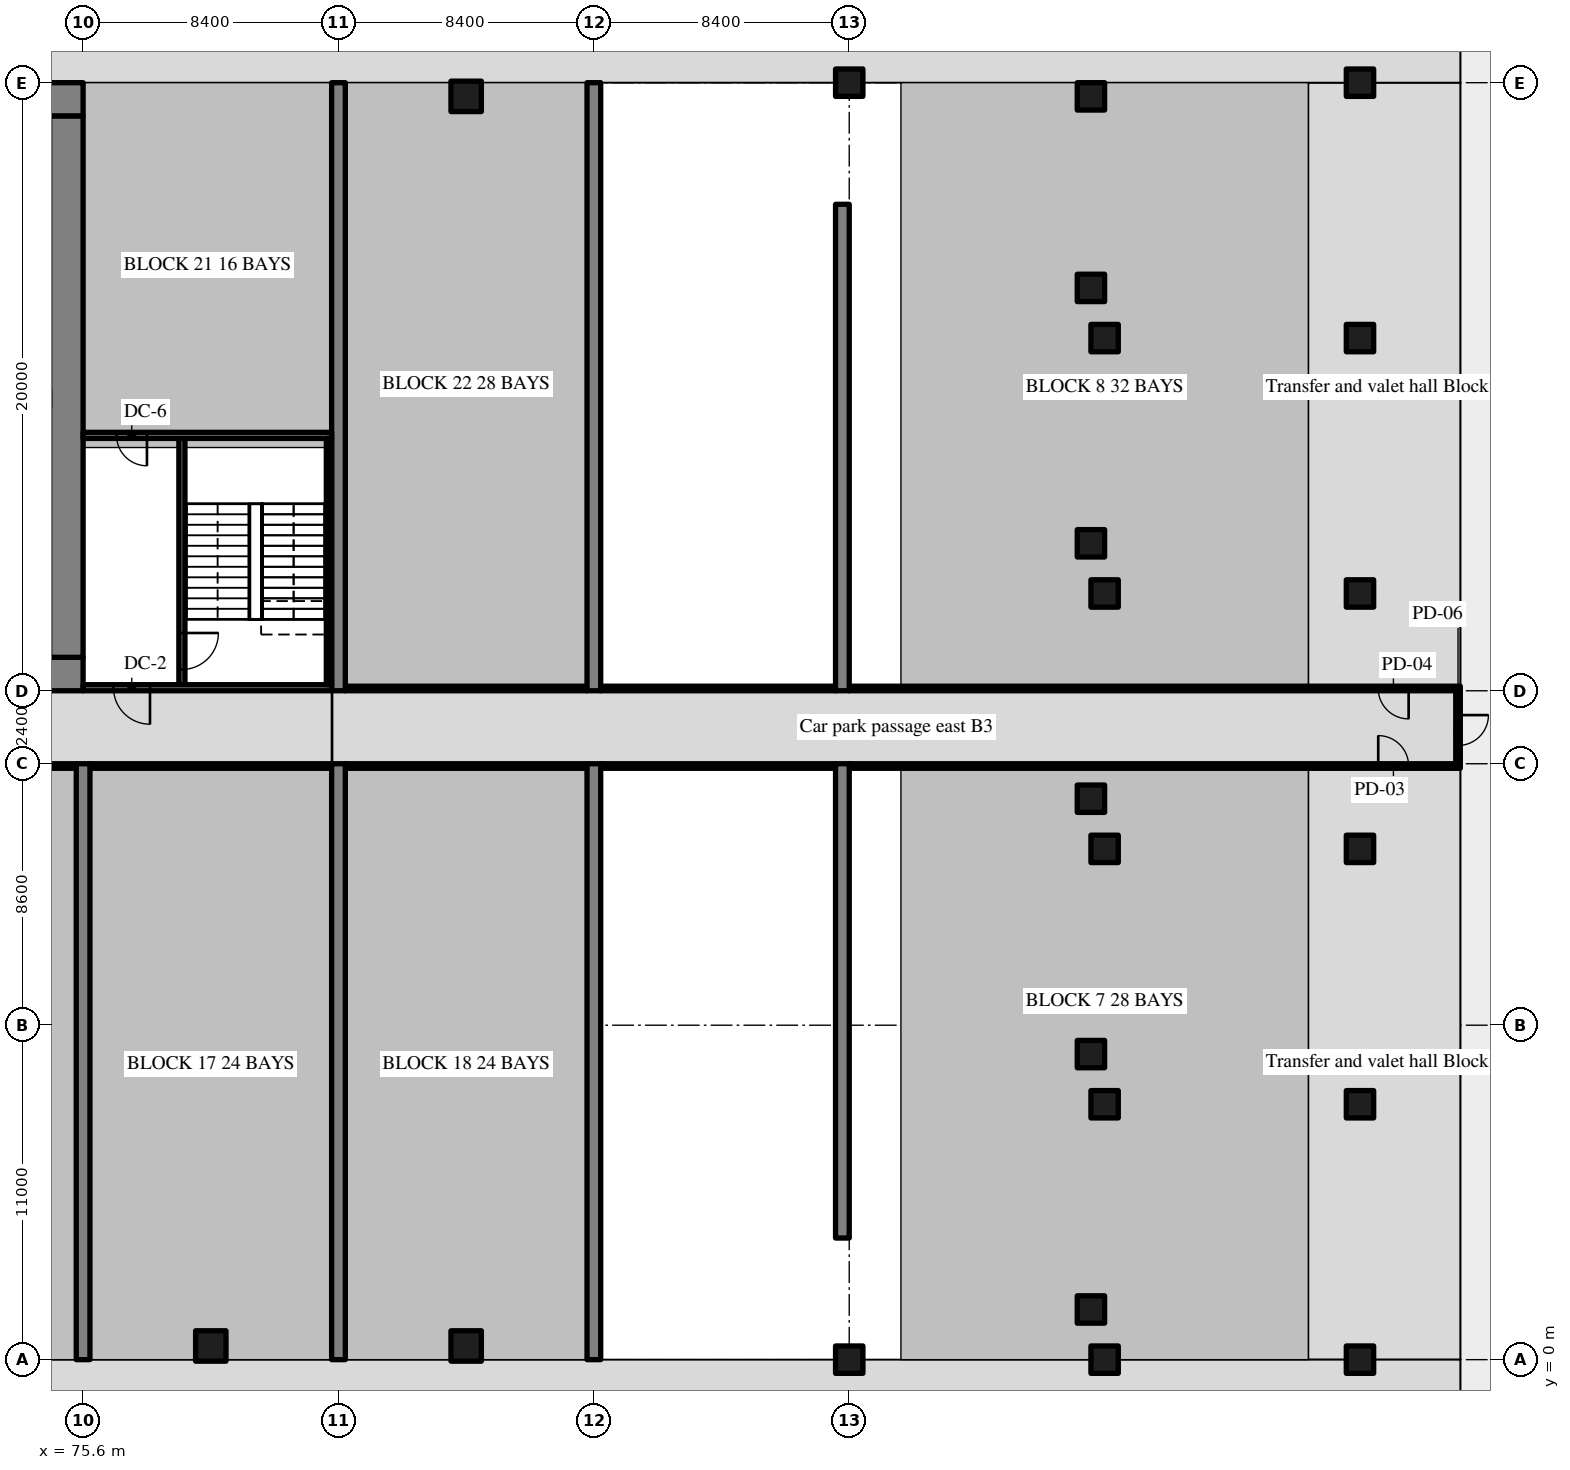
"""IFC4 building model, lengths in metres.
Left out: names, types, materials, properties, quantities, classifications, styles, units other than length and angle.
Written with IfcOpenShell. Run it as: python <this file> out.ifc"""

import sys

from ifc_helpers import new_model, si_unit, direction, frame, frame_2d, origin, origin_2d, place, context, subcontext, project, spatial, rectangle, extrude, source, transform, mapped, element, fill, save


model = new_model("IFC4")
c1 = context("Model", 3, precision=1e-05, world=origin(), true_north=direction((0.0, 1.0)))
c2 = subcontext(c1, "Body", "Model", "MODEL_VIEW")
j1 = project(units=[si_unit("LENGTHUNIT", "METRE"), si_unit("PLANEANGLEUNIT", "RADIAN")], contexts=[c1])
p1 = place(None, origin())
s1 = spatial("IfcSite", under=j1, at=p1, CompositionType="ELEMENT")
p2 = place(p1, origin())
s2 = spatial("IfcBuilding", under=s1, at=p2, CompositionType="ELEMENT")
p3 = place(p2, frame((0.0, 0.0, -13.5)))
s3 = spatial("IfcBuildingStorey", under=s2, at=p3, CompositionType="ELEMENT", Elevation=-13.5)
m1 = source(origin(), c2, "Body", "SweptSolid", [
    extrude(rectangle(XDim=50.4, YDim=1.1, at=frame_2d((25.2, 0.0))), origin(), (0.0, 0.0, 1.0), 4.52),
])
p4 = place(p3, frame((25.2, 22.55, -0.3), z_axis=(0.0, 0.0, 1.0), x_axis=(1.0, 0.0, 0.0)))
e1 = element("IfcWall", 1, at=p4, inside=s3, PredefinedType="SHEAR", context=c2, shape_type="MappedRepresentation", body=[
    mapped(m1, transform((0.0, 0.0, 0.0), scale=1.0)),
])
m2 = source(origin(), c2, "Body", "SweptSolid", [
    extrude(rectangle(XDim=1.8, YDim=2.1, at=frame_2d((0.9, 1.05))), frame((0.0, 0.56, 0.0), z_axis=(0.0, -1.0, 0.0), x_axis=(1.0, 0.0, 0.0)), (0.0, 0.0, 1.0), 1.12),
])
p5 = place(p4, frame((15.9, 0.0, 0.0)))
e2 = element("IfcOpeningElement", 2, at=p5, cuts=e1, PredefinedType="OPENING", context=c2, shape_type="MappedRepresentation", body=[
    mapped(m2, transform((0.0, 0.0, 0.0), scale=1.0)),
])
m3 = source(origin(), c2, "Body", "SweptSolid", [
    extrude(rectangle(XDim=1.2, YDim=2.1, at=frame_2d((0.6, 1.05))), frame((0.0, 0.56, 0.0), z_axis=(0.0, -1.0, 0.0), x_axis=(1.0, 0.0, 0.0)), (0.0, 0.0, 1.0), 1.12),
])
p6 = place(p4, frame((27.0, 0.0, 0.0)))
e3 = element("IfcOpeningElement", 3, at=p6, cuts=e1, PredefinedType="OPENING", context=c2, shape_type="MappedRepresentation", body=[
    mapped(m3, transform((0.0, 0.0, 0.0), scale=1.0)),
])
m4 = source(origin(), c2, "Body", "SweptSolid", [
    extrude(rectangle(XDim=0.9, YDim=2.1, at=frame_2d((0.45, 1.05))), frame((0.0, 0.56, 0.0), z_axis=(0.0, -1.0, 0.0), x_axis=(1.0, 0.0, 0.0)), (0.0, 0.0, 1.0), 1.12),
])
p7 = place(p4, frame((33.75, 0.0, 0.0)))
e4 = element("IfcOpeningElement", 4, at=p7, cuts=e1, PredefinedType="OPENING", context=c2, shape_type="MappedRepresentation", body=[
    mapped(m4, transform((0.0, 0.0, 0.0), scale=1.0)),
])
p8 = place(p4, frame((30.75, 0.0, 0.0)))
e5 = element("IfcOpeningElement", 5, at=p8, cuts=e1, PredefinedType="OPENING", context=c2, shape_type="MappedRepresentation", body=[
    mapped(m4, transform((0.0, 0.0, 0.0), scale=1.0)),
])
p9 = place(p4, frame((38.25, 0.0, 0.0)))
e6 = element("IfcOpeningElement", 6, at=p9, cuts=e1, PredefinedType="OPENING", context=c2, shape_type="MappedRepresentation", body=[
    mapped(m4, transform((0.0, 0.0, 0.0), scale=1.0)),
])
p10 = place(p4, frame((6.425, 0.0, 0.0)))
e7 = element("IfcOpeningElement", 7, at=p10, cuts=e1, PredefinedType="OPENING", context=c2, shape_type="MappedRepresentation", body=[
    mapped(m3, transform((0.0, 0.0, 0.0), scale=1.0)),
])
p11 = place(p4, frame((47.675, 0.0, 0.0)))
e8 = element("IfcOpeningElement", 8, at=p11, cuts=e1, PredefinedType="OPENING", context=c2, shape_type="MappedRepresentation", body=[
    mapped(m3, transform((0.0, 0.0, 0.0), scale=1.0)),
])
p12 = place(p3, frame((25.2, 41.45, -0.3), z_axis=(0.0, 0.0, 1.0), x_axis=(1.0, 0.0, 0.0)))
e9 = element("IfcWall", 9, at=p12, inside=s3, PredefinedType="SHEAR", context=c2, shape_type="MappedRepresentation", body=[
    mapped(m1, transform((0.0, 0.0, 0.0), scale=1.0)),
])
m5 = source(origin(), c2, "Body", "SweptSolid", [
    extrude(rectangle(XDim=17.8, YDim=1.1, at=frame_2d((8.9, 0.0))), origin(), (0.0, 0.0, 1.0), 4.52),
])
p13 = place(p3, frame((75.05, 23.1, -0.3), z_axis=(0.0, 0.0, 1.0), x_axis=(0.0, 1.0, 0.0)))
e10 = element("IfcWall", 10, at=p13, inside=s3, PredefinedType="SHEAR", context=c2, shape_type="MappedRepresentation", body=[
    mapped(m5, transform((0.0, 0.0, 0.0), scale=1.0)),
])
m6 = source(origin(), c2, "Body", "SweptSolid", [
    extrude(rectangle(XDim=19.6, YDim=0.45, at=frame_2d((9.8, 0.0))), origin(), (0.0, 0.0, 1.0), 4.52),
])
for number, where, z_axis, x_axis in (
    (11, (75.6, 0.0, -0.3), (0.0, 0.0, 1.0), (0.0, 1.0, 0.0)),
    (12, (84.0, 0.0, -0.3), (0.0, 0.0, 1.0), (0.0, 1.0, 0.0)),
):
    element("IfcWall", number, at=place(p3, frame(where, z_axis=z_axis, x_axis=x_axis)), inside=s3, PredefinedType="SHEAR", context=c2, shape_type="MappedRepresentation", body=[
        mapped(m6, transform((0.0, 0.0, 0.0), scale=1.0)),
    ])
m7 = source(origin(), c2, "Body", "SweptSolid", [
    extrude(rectangle(XDim=20.0, YDim=0.45, at=frame_2d((10.0, 0.0))), origin(), (0.0, 0.0, 1.0), 4.52),
])
p14 = place(p3, frame((84.0, 22.0, -0.3), z_axis=(0.0, 0.0, 1.0), x_axis=(0.0, 1.0, 0.0)))
e13 = element("IfcWall", 13, at=p14, inside=s3, PredefinedType="SHEAR", context=c2, shape_type="MappedRepresentation", body=[
    mapped(m7, transform((0.0, 0.0, 0.0), scale=1.0)),
])
p15 = place(p3, frame((92.4, 0.0, -0.3), z_axis=(0.0, 0.0, 1.0), x_axis=(0.0, 1.0, 0.0)))
e14 = element("IfcWall", 14, at=p15, inside=s3, PredefinedType="SHEAR", context=c2, shape_type="MappedRepresentation", body=[
    mapped(m6, transform((0.0, 0.0, 0.0), scale=1.0)),
])
p16 = place(p3, frame((92.4, 22.0, -0.3), z_axis=(0.0, 0.0, 1.0), x_axis=(0.0, 1.0, 0.0)))
e15 = element("IfcWall", 15, at=p16, inside=s3, PredefinedType="SHEAR", context=c2, shape_type="MappedRepresentation", body=[
    mapped(m7, transform((0.0, 0.0, 0.0), scale=1.0)),
])
m8 = source(origin(), c2, "Body", "SweptSolid", [
    extrude(rectangle(XDim=15.6, YDim=0.45, at=frame_2d((7.8, 0.0))), origin(), (0.0, 0.0, 1.0), 4.52),
])
p17 = place(p3, frame((100.575, 4.0, -0.3), z_axis=(0.0, 0.0, 1.0), x_axis=(0.0, 1.0, 0.0)))
e16 = element("IfcWall", 16, at=p17, inside=s3, PredefinedType="SHEAR", context=c2, shape_type="MappedRepresentation", body=[
    mapped(m8, transform((0.0, 0.0, 0.0), scale=1.0)),
])
m9 = source(origin(), c2, "Body", "SweptSolid", [
    extrude(rectangle(XDim=16.0, YDim=0.45, at=frame_2d((8.0, 0.0))), origin(), (0.0, 0.0, 1.0), 4.52),
])
p18 = place(p3, frame((100.575, 22.0, -0.3), z_axis=(0.0, 0.0, 1.0), x_axis=(0.0, 1.0, 0.0)))
e17 = element("IfcWall", 17, at=p18, inside=s3, PredefinedType="SHEAR", context=c2, shape_type="MappedRepresentation", body=[
    mapped(m9, transform((0.0, 0.0, 0.0), scale=1.0)),
])
m10 = source(origin(), c2, "Body", "SweptSolid", [
    extrude(rectangle(XDim=1.0, YDim=1.0, at=origin_2d()), origin(), (0.0, 0.0, 1.0), 4.52),
])
for number, where, z_axis, x_axis in (
    (18, (79.8, 0.45, -0.3), (0.0, 0.0, 1.0), (1.0, 0.0, 0.0)),
    (19, (88.2, 0.45, -0.3), (0.0, 0.0, 1.0), (1.0, 0.0, 0.0)),
    (20, (88.2, 41.55, -0.3), (0.0, 0.0, 1.0), (1.0, 0.0, 0.0)),
):
    element("IfcColumn", number, at=place(p3, frame(where, z_axis=z_axis, x_axis=x_axis)), inside=s3, PredefinedType="COLUMN", context=c2, shape_type="MappedRepresentation", body=[
        mapped(m10, transform((0.0, 0.0, 0.0), scale=1.0)),
    ])
m11 = source(origin(), c2, "Body", "SweptSolid", [
    extrude(rectangle(XDim=0.9, YDim=0.9, at=origin_2d()), origin(), (0.0, 0.0, 1.0), 4.52),
])
for number, where, z_axis, x_axis in (
    (21, (108.75, 1.65, -0.3), (0.0, 0.0, 1.0), (1.0, 0.0, 0.0)),
    (22, (108.75, 10.05, -0.3), (0.0, 0.0, 1.0), (1.0, 0.0, 0.0)),
    (23, (108.75, 18.45, -0.3), (0.0, 0.0, 1.0), (1.0, 0.0, 0.0)),
    (24, (108.75, 26.85, -0.3), (0.0, 0.0, 1.0), (1.0, 0.0, 0.0)),
    (25, (108.75, 35.25, -0.3), (0.0, 0.0, 1.0), (1.0, 0.0, 0.0)),
    (26, (108.75, 41.55, -0.3), (0.0, 0.0, 1.0), (1.0, 0.0, 0.0)),
    (27, (100.8, 0.0, -0.3), (0.0, 0.0, 1.0), (1.0, 0.0, 0.0)),
    (28, (100.8, 42.0, -0.3), (0.0, 0.0, 1.0), (1.0, 0.0, 0.0)),
    (29, (109.2, 0.0, -0.3), (0.0, 0.0, 1.0), (1.0, 0.0, 0.0)),
    (30, (109.2, 8.4, -0.3), (0.0, 0.0, 1.0), (1.0, 0.0, 0.0)),
    (31, (109.2, 16.8, -0.3), (0.0, 0.0, 1.0), (1.0, 0.0, 0.0)),
    (32, (109.2, 25.2, -0.3), (0.0, 0.0, 1.0), (1.0, 0.0, 0.0)),
    (33, (109.2, 33.6, -0.3), (0.0, 0.0, 1.0), (1.0, 0.0, 0.0)),
    (34, (117.6, 0.0, -0.3), (0.0, 0.0, 1.0), (1.0, 0.0, 0.0)),
    (35, (117.6, 8.4, -0.3), (0.0, 0.0, 1.0), (1.0, 0.0, 0.0)),
    (36, (117.6, 16.8, -0.3), (0.0, 0.0, 1.0), (1.0, 0.0, 0.0)),
    (37, (117.6, 25.2, -0.3), (0.0, 0.0, 1.0), (1.0, 0.0, 0.0)),
    (38, (117.6, 33.6, -0.3), (0.0, 0.0, 1.0), (1.0, 0.0, 0.0)),
    (39, (117.6, 42.0, -0.3), (0.0, 0.0, 1.0), (1.0, 0.0, 0.0)),
):
    element("IfcColumn", number, at=place(p3, frame(where, z_axis=z_axis, x_axis=x_axis)), inside=s3, PredefinedType="COLUMN", context=c2, shape_type="MappedRepresentation", body=[
        mapped(m11, transform((0.0, 0.0, 0.0), scale=1.0)),
    ])
m12 = source(origin(), c2, "Body", "SweptSolid", [
    extrude(rectangle(XDim=8.3, YDim=0.2, at=frame_2d((4.15, 0.0))), origin(), (0.0, 0.0, 1.0), 4.52),
])
p19 = place(p3, frame((78.85, 22.1, -0.3), z_axis=(0.0, 0.0, 1.0), x_axis=(0.0, 1.0, 0.0)))
e40 = element("IfcWall", 40, at=p19, inside=s3, PredefinedType="SOLIDWALL", context=c2, shape_type="MappedRepresentation", body=[
    mapped(m12, transform((0.0, 0.0, 0.0), scale=1.0)),
])
m13 = source(origin(), c2, "Body", "SweptSolid", [
    extrude(rectangle(XDim=1.2, YDim=2.1, at=frame_2d((0.6, 1.05))), frame((0.0, 0.11, 0.0), z_axis=(0.0, -1.0, 0.0), x_axis=(1.0, 0.0, 0.0)), (0.0, 0.0, 1.0), 0.22),
])
p20 = place(p19, frame((0.6, 0.0, 0.0)))
e41 = element("IfcOpeningElement", 41, at=p20, cuts=e40, PredefinedType="OPENING", context=c2, shape_type="MappedRepresentation", body=[
    mapped(m13, transform((0.0, 0.0, 0.0), scale=1.0)),
])
m14 = source(origin(), c2, "Body", "SweptSolid", [
    extrude(rectangle(XDim=8.175, YDim=0.2, at=frame_2d((4.087, 0.0))), origin(), (0.0, 0.0, 1.0), 4.52),
])
p21 = place(p3, frame((83.775, 22.1, -0.3), z_axis=(0.0, 0.0, 1.0), x_axis=(-1.0, 0.0, 0.0)))
e42 = element("IfcWall", 42, at=p21, inside=s3, PredefinedType="SOLIDWALL", context=c2, shape_type="MappedRepresentation", body=[
    mapped(m14, transform((0.0, 0.0, 0.0), scale=1.0)),
])
p22 = place(p21, frame((5.975, 0.0, 0.0)))
e43 = element("IfcOpeningElement", 43, at=p22, cuts=e42, PredefinedType="OPENING", context=c2, shape_type="MappedRepresentation", body=[
    mapped(m13, transform((0.0, 0.0, 0.0), scale=1.0)),
])
p23 = place(p3, frame((83.775, 30.4, -0.3), z_axis=(0.0, 0.0, 1.0), x_axis=(-1.0, 0.0, 0.0)))
e44 = element("IfcWall", 44, at=p23, inside=s3, PredefinedType="SOLIDWALL", context=c2, shape_type="MappedRepresentation", body=[
    mapped(m14, transform((0.0, 0.0, 0.0), scale=1.0)),
])
m15 = source(origin(), c2, "Body", "SweptSolid", [
    extrude(rectangle(XDim=1.0, YDim=2.1, at=frame_2d((0.5, 1.05))), frame((0.0, 0.11, 0.0), z_axis=(0.0, -1.0, 0.0), x_axis=(1.0, 0.0, 0.0)), (0.0, 0.0, 1.0), 0.22),
])
p24 = place(p23, frame((6.075, 0.0, 0.0)))
e45 = element("IfcOpeningElement", 45, at=p24, cuts=e44, PredefinedType="OPENING", context=c2, shape_type="MappedRepresentation", body=[
    mapped(m15, transform((0.0, 0.0, 0.0), scale=1.0)),
])
m16 = source(origin(), c2, "Body", "SweptSolid", [
    extrude(rectangle(XDim=8.1, YDim=0.175, at=frame_2d((4.05, 0.0))), origin(), (0.0, 0.0, 1.0), 4.52),
])
p25 = place(p3, frame((83.688, 22.2, -0.3), z_axis=(0.0, 0.0, 1.0), x_axis=(0.0, 1.0, 0.0)))
e46 = element("IfcWall", 46, at=p25, inside=s3, PredefinedType="SOLIDWALL", context=c2, shape_type="MappedRepresentation", body=[
    mapped(m16, transform((0.0, 0.0, 0.0), scale=1.0)),
])
m17 = source(origin(), c2, "Body", "SweptSolid", [
    extrude(rectangle(XDim=7.95, YDim=0.15, at=frame_2d((3.975, 0.0))), origin(), (0.0, 0.0, 1.0), 4.22),
])
for number, where, z_axis, x_axis in (
    (47, (67.425, 19.525, 0.0), (0.0, 0.0, 1.0), (1.0, 0.0, 0.0)),
    (48, (75.825, 19.525, 0.0), (0.0, 0.0, 1.0), (1.0, 0.0, 0.0)),
    (49, (84.225, 19.525, 0.0), (0.0, 0.0, 1.0), (1.0, 0.0, 0.0)),
    (50, (84.225, 22.075, 0.0), (0.0, 0.0, 1.0), (1.0, 0.0, 0.0)),
):
    element("IfcWall", number, at=place(p3, frame(where, z_axis=z_axis, x_axis=x_axis)), inside=s3, PredefinedType="PARTITIONING", context=c2, shape_type="MappedRepresentation", body=[
        mapped(m17, transform((0.0, 0.0, 0.0), scale=1.0)),
    ])
m18 = source(origin(), c2, "Body", "SweptSolid", [
    extrude(rectangle(XDim=7.725, YDim=0.15, at=frame_2d((3.863, 0.0))), origin(), (0.0, 0.0, 1.0), 4.22),
])
for number, where, z_axis, x_axis in (
    (51, (92.625, 19.525, 0.0), (0.0, 0.0, 1.0), (1.0, 0.0, 0.0)),
    (52, (92.625, 22.075, 0.0), (0.0, 0.0, 1.0), (1.0, 0.0, 0.0)),
):
    element("IfcWall", number, at=place(p3, frame(where, z_axis=z_axis, x_axis=x_axis)), inside=s3, PredefinedType="PARTITIONING", context=c2, shape_type="MappedRepresentation", body=[
        mapped(m18, transform((0.0, 0.0, 0.0), scale=1.0)),
    ])
m19 = source(origin(), c2, "Body", "SweptSolid", [
    extrude(rectangle(XDim=20.1, YDim=0.15, at=frame_2d((10.05, 0.0))), origin(), (0.0, 0.0, 1.0), 4.22),
])
p26 = place(p3, frame((100.8, 19.525, 0.0), z_axis=(0.0, 0.0, 1.0), x_axis=(1.0, 0.0, 0.0)))
e53 = element("IfcWall", 53, at=p26, inside=s3, PredefinedType="PARTITIONING", context=c2, shape_type="MappedRepresentation", body=[
    mapped(m19, transform((0.0, 0.0, 0.0), scale=1.0)),
])
m20 = source(origin(), c2, "Body", "SweptSolid", [
    extrude(rectangle(XDim=1.0, YDim=2.1, at=frame_2d((0.5, 1.05))), frame((0.0, 0.085, 0.0), z_axis=(0.0, -1.0, 0.0), x_axis=(1.0, 0.0, 0.0)), (0.0, 0.0, 1.0), 0.17),
])
p27 = place(p26, frame((17.4, 0.0, 0.0)))
e54 = element("IfcOpeningElement", 54, at=p27, cuts=e53, PredefinedType="OPENING", context=c2, shape_type="MappedRepresentation", body=[
    mapped(m20, transform((0.0, 0.0, 0.0), scale=1.0)),
])
p28 = place(p3, frame((100.8, 22.075, 0.0), z_axis=(0.0, 0.0, 1.0), x_axis=(1.0, 0.0, 0.0)))
e55 = element("IfcWall", 55, at=p28, inside=s3, PredefinedType="PARTITIONING", context=c2, shape_type="MappedRepresentation", body=[
    mapped(m19, transform((0.0, 0.0, 0.0), scale=1.0)),
])
p29 = place(p28, frame((17.4, 0.0, 0.0)))
e56 = element("IfcOpeningElement", 56, at=p29, cuts=e55, PredefinedType="OPENING", context=c2, shape_type="MappedRepresentation", body=[
    mapped(m20, transform((0.0, 0.0, 0.0), scale=1.0)),
])
m21 = source(origin(), c2, "Body", "SweptSolid", [
    extrude(rectangle(XDim=2.4, YDim=0.15, at=frame_2d((1.2, 0.0))), origin(), (0.0, 0.0, 1.0), 4.22),
])
p30 = place(p3, frame((120.825, 19.6, 0.0), z_axis=(0.0, 0.0, 1.0), x_axis=(0.0, 1.0, 0.0)))
e57 = element("IfcWall", 57, at=p30, inside=s3, PredefinedType="PARTITIONING", context=c2, shape_type="MappedRepresentation", body=[
    mapped(m21, transform((0.0, 0.0, 0.0), scale=1.0)),
])
p31 = place(p30, frame((0.6, 0.0, 0.0)))
e58 = element("IfcOpeningElement", 58, at=p31, cuts=e57, PredefinedType="OPENING", context=c2, shape_type="MappedRepresentation", body=[
    mapped(m20, transform((0.0, 0.0, 0.0), scale=1.0)),
])
m22 = source(origin(), c2, "Body", "SweptSolid", [
    extrude(rectangle(XDim=1.2, YDim=2.1, at=frame_2d((0.6, 1.05))), frame((0.0, 0.025, 0.0), z_axis=(0.0, -1.0, 0.0), x_axis=(1.0, 0.0, 0.0)), (0.0, 0.0, 1.0), 0.05),
])
p32 = place(p20, origin())
e59 = element("IfcDoor", 59, at=p32, inside=s3, OperationType="SINGLE_SWING_RIGHT", PredefinedType="DOOR", context=c2, shape_type="MappedRepresentation", body=[
    mapped(m22, transform((0.0, 0.0, 0.0), scale=1.0)),
])
fill(e41, e59)
p33 = place(p22, origin())
e60 = element("IfcDoor", 60, at=p33, inside=s3, OperationType="SINGLE_SWING_LEFT", PredefinedType="DOOR", context=c2, shape_type="MappedRepresentation", body=[
    mapped(m22, transform((0.0, 0.0, 0.0), scale=1.0)),
])
fill(e43, e60)
m23 = source(origin(), c2, "Body", "SweptSolid", [
    extrude(rectangle(XDim=1.0, YDim=2.1, at=frame_2d((0.5, 1.05))), frame((0.0, 0.025, 0.0), z_axis=(0.0, -1.0, 0.0), x_axis=(1.0, 0.0, 0.0)), (0.0, 0.0, 1.0), 0.05),
])
p34 = place(p24, origin())
e61 = element("IfcDoor", 61, at=p34, inside=s3, OperationType="SINGLE_SWING_LEFT", PredefinedType="DOOR", context=c2, shape_type="MappedRepresentation", body=[
    mapped(m23, transform((0.0, 0.0, 0.0), scale=1.0)),
])
fill(e45, e61)
p35 = place(p27, origin())
e62 = element("IfcDoor", 62, at=p35, inside=s3, OperationType="SINGLE_SWING_LEFT", PredefinedType="DOOR", context=c2, shape_type="MappedRepresentation", body=[
    mapped(m23, transform((0.0, 0.0, 0.0), scale=1.0)),
])
fill(e54, e62)
p36 = place(p29, origin())
e63 = element("IfcDoor", 63, at=p36, inside=s3, OperationType="SINGLE_SWING_RIGHT", PredefinedType="DOOR", context=c2, shape_type="MappedRepresentation", body=[
    mapped(m23, transform((0.0, 0.0, 0.0), scale=1.0)),
])
fill(e56, e63)
p37 = place(p31, origin())
e64 = element("IfcDoor", 64, at=p37, inside=s3, OperationType="SINGLE_SWING_RIGHT", PredefinedType="DOOR", context=c2, shape_type="MappedRepresentation", body=[
    mapped(m23, transform((0.0, 0.0, 0.0), scale=1.0)),
])
fill(e58, e64)
save(model, sys.argv[1])
